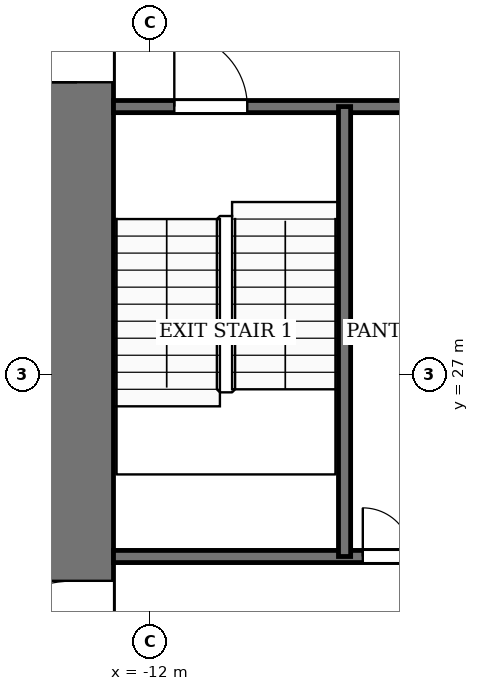
"""IFC4 building model, lengths in metres.
Left out: names, types, materials, properties, quantities, classifications, styles, units other than length and angle.
Written with IfcOpenShell. Run it as: python <this file> out.ifc"""

import sys

from ifc_helpers import new_model, si_unit, direction, frame, frame_2d, origin, place, context, subcontext, project, spatial, rectangle, extrude, element, fill, save


model = new_model("IFC4")
c1 = context("Model", 3, precision=1e-05, world=origin(), true_north=direction((0.0, 1.0)))
c2 = subcontext(c1, "Body", "Model", "MODEL_VIEW")
j1 = project(units=[si_unit("LENGTHUNIT", "METRE"), si_unit("PLANEANGLEUNIT", "RADIAN")], contexts=[c1])
p1 = place(None, origin())
s1 = spatial("IfcSite", under=j1, at=p1, CompositionType="ELEMENT")
p2 = place(p1, origin())
s2 = spatial("IfcBuilding", under=s1, at=p2, CompositionType="ELEMENT")
p3 = place(p2, frame((0.0, 0.0, 102.0)))
s3 = spatial("IfcBuildingStorey", under=s2, at=p3, CompositionType="ELEMENT", Elevation=102.0)
p4 = place(p3, frame((-13.2, 18.4, -0.13), z_axis=(0.0, 0.0, 1.0), x_axis=(0.0, 1.0, 0.0)))
e1 = element("IfcWall", 1, at=p4, inside=s3, PredefinedType="SHEAR", context=c2, shape_type="SweptSolid", body=[
    extrude(rectangle(XDim=19.2, YDim=1.2, at=frame_2d((9.6, 0.0))), origin(), (0.0, 0.0, 1.0), 4.0),
])
p5 = place(p4, frame((2.8, 0.0, 0.13)))
e2 = element("IfcOpeningElement", 2, at=p5, cuts=e1, PredefinedType="OPENING", context=c2, shape_type="SweptSolid", body=[
    extrude(rectangle(XDim=2.4, YDim=2.4, at=frame_2d((1.2, 1.2))), frame((0.0, 0.61, 0.0), z_axis=(0.0, -1.0, 0.0), x_axis=(1.0, 0.0, 0.0)), (0.0, 0.0, 1.0), 1.22),
])
p6 = place(p4, frame((13.4, 0.0, 0.13)))
e3 = element("IfcOpeningElement", 3, at=p6, cuts=e1, PredefinedType="OPENING", context=c2, shape_type="SweptSolid", body=[
    extrude(rectangle(XDim=1.4, YDim=2.2, at=frame_2d((0.7, 1.1))), frame((0.0, 0.61, 0.0), z_axis=(0.0, -1.0, 0.0), x_axis=(1.0, 0.0, 0.0)), (0.0, 0.0, 1.0), 1.22),
])
p7 = place(p3, frame((-12.6, 24.0, 0.0), z_axis=(0.0, 0.0, 1.0), x_axis=(1.0, 0.0, 0.0)))
e4 = element("IfcWall", 4, at=p7, inside=s3, PredefinedType="PARTITIONING", context=c2, shape_type="SweptSolid", body=[
    extrude(rectangle(XDim=6.6, YDim=0.2, at=frame_2d((3.3, 0.0))), origin(), (0.0, 0.0, 1.0), 3.87),
])
p8 = place(p7, frame((4.1, 0.0, 0.0)))
e5 = element("IfcOpeningElement", 5, at=p8, cuts=e4, PredefinedType="OPENING", context=c2, shape_type="SweptSolid", body=[
    extrude(rectangle(XDim=0.8, YDim=2.1, at=frame_2d((0.4, 1.05))), frame((0.0, 0.11, 0.0), z_axis=(0.0, -1.0, 0.0), x_axis=(1.0, 0.0, 0.0)), (0.0, 0.0, 1.0), 0.22),
])
p9 = place(p7, frame((5.5, 0.0, 0.0)))
e6 = element("IfcOpeningElement", 6, at=p9, cuts=e4, PredefinedType="OPENING", context=c2, shape_type="SweptSolid", body=[
    extrude(rectangle(XDim=0.8, YDim=2.1, at=frame_2d((0.4, 1.05))), frame((0.0, 0.11, 0.0), z_axis=(0.0, -1.0, 0.0), x_axis=(1.0, 0.0, 0.0)), (0.0, 0.0, 1.0), 0.22),
])
p10 = place(p3, frame((-12.6, 31.4, 0.0), z_axis=(0.0, 0.0, 1.0), x_axis=(1.0, 0.0, 0.0)))
e7 = element("IfcWall", 7, at=p10, inside=s3, PredefinedType="PARTITIONING", context=c2, shape_type="SweptSolid", body=[
    extrude(rectangle(XDim=6.6, YDim=0.2, at=frame_2d((3.3, 0.0))), origin(), (0.0, 0.0, 1.0), 3.87),
])
p11 = place(p10, frame((1.0, 0.0, 0.0)))
e8 = element("IfcOpeningElement", 8, at=p11, cuts=e7, PredefinedType="OPENING", context=c2, shape_type="SweptSolid", body=[
    extrude(rectangle(XDim=1.2, YDim=2.2, at=frame_2d((0.6, 1.1))), frame((0.0, 0.11, 0.0), z_axis=(0.0, -1.0, 0.0), x_axis=(1.0, 0.0, 0.0)), (0.0, 0.0, 1.0), 0.22),
])
p12 = place(p3, frame((-8.8, 24.0, 0.0), z_axis=(0.0, 0.0, 1.0), x_axis=(0.0, 1.0, 0.0)))
e9 = element("IfcWall", 9, at=p12, inside=s3, PredefinedType="PARTITIONING", context=c2, shape_type="SweptSolid", body=[
    extrude(rectangle(XDim=7.4, YDim=0.2, at=frame_2d((3.7, 0.0))), origin(), (0.0, 0.0, 1.0), 3.87),
])
p13 = place(p8, origin())
e10 = element("IfcDoor", 10, at=p13, inside=s3, OperationType="SINGLE_SWING_LEFT", PredefinedType="DOOR", context=c2, shape_type="SweptSolid", body=[
    extrude(rectangle(XDim=0.8, YDim=2.1, at=frame_2d((0.4, 1.05))), frame((0.0, 0.025, 0.0), z_axis=(0.0, -1.0, 0.0), x_axis=(1.0, 0.0, 0.0)), (0.0, 0.0, 1.0), 0.05),
])
fill(e5, e10)
p14 = place(p11, origin())
e11 = element("IfcDoor", 11, at=p14, inside=s3, OperationType="SINGLE_SWING_RIGHT", PredefinedType="DOOR", context=c2, shape_type="SweptSolid", body=[
    extrude(rectangle(XDim=1.2, YDim=2.2, at=frame_2d((0.6, 1.1))), frame((0.0, 0.025, 0.0), z_axis=(0.0, -1.0, 0.0), x_axis=(1.0, 0.0, 0.0)), (0.0, 0.0, 1.0), 0.05),
])
fill(e8, e11)
p15 = place(p5, origin())
e12 = element("IfcDoor", 12, at=p15, inside=s3, OperationType="DOUBLE_DOOR_SINGLE_SWING", PredefinedType="DOOR", context=c2, shape_type="SweptSolid", body=[
    extrude(rectangle(XDim=2.4, YDim=2.4, at=frame_2d((1.2, 1.2))), frame((0.0, 0.025, 0.0), z_axis=(0.0, -1.0, 0.0), x_axis=(1.0, 0.0, 0.0)), (0.0, 0.0, 1.0), 0.05),
])
fill(e2, e12)
p16 = place(p6, origin())
e13 = element("IfcDoor", 13, at=p16, inside=s3, OperationType="SINGLE_SWING_RIGHT", PredefinedType="DOOR", context=c2, shape_type="SweptSolid", body=[
    extrude(rectangle(XDim=1.4, YDim=2.2, at=frame_2d((0.7, 1.1))), frame((0.0, 0.025, 0.0), z_axis=(0.0, -1.0, 0.0), x_axis=(1.0, 0.0, 0.0)), (0.0, 0.0, 1.0), 0.05),
])
fill(e3, e13)
save(model, sys.argv[1])
